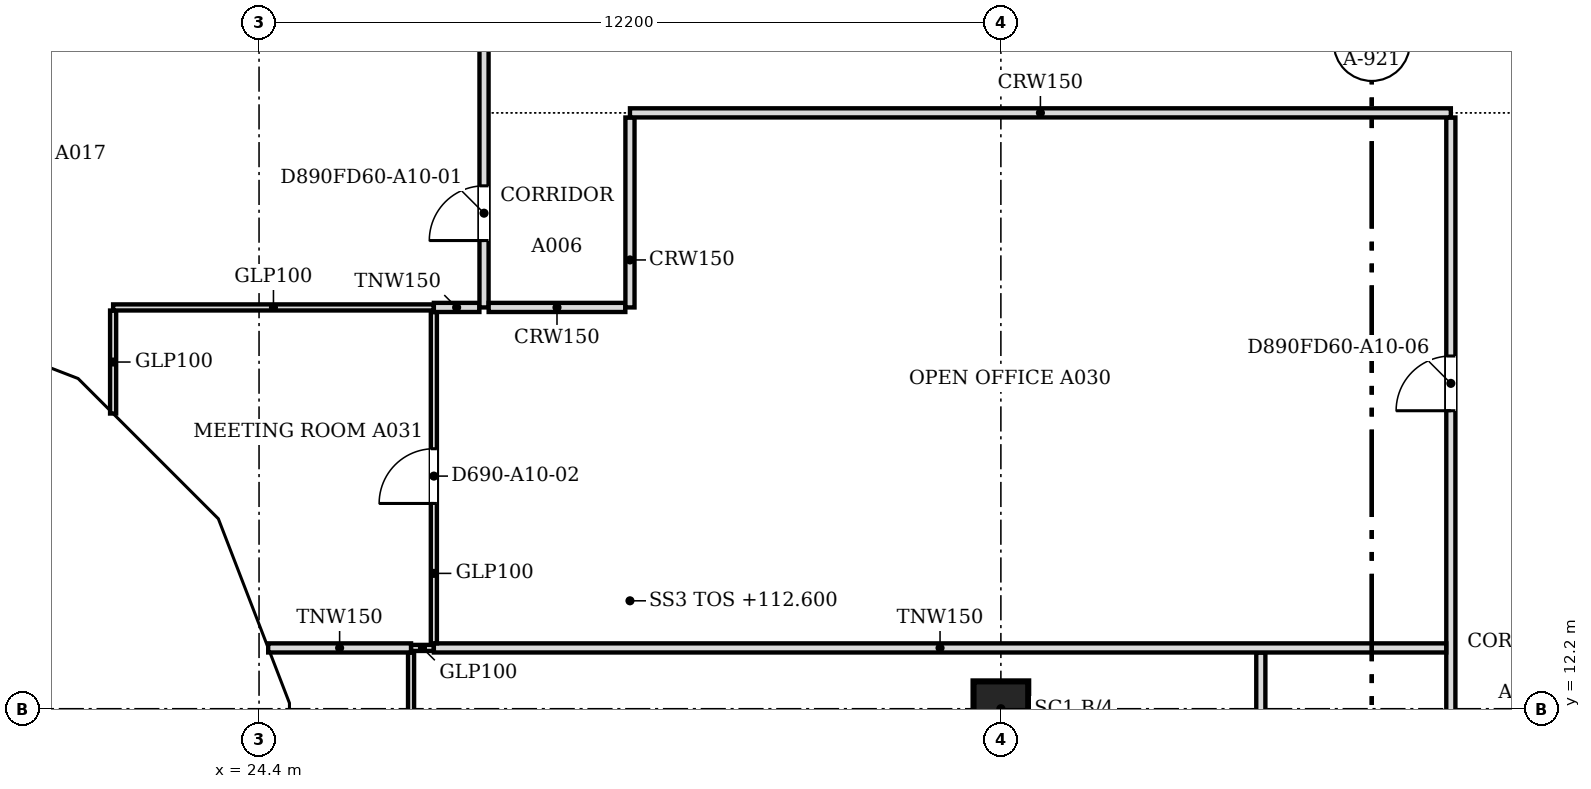
"""IFC4 building model, lengths in metres.
Left out: names, types, materials, properties, quantities, classifications, styles, units other than length and angle.
Written with IfcOpenShell. Run it as: python <this file> out.ifc"""

import sys

from ifc_helpers import new_model, si_unit, direction, frame, frame_2d, origin, origin_2d, place, context, subcontext, project, spatial, polyline, rectangle, outline, extrude, faceted_brep, source, transform, mapped, element, fill, save


model = new_model("IFC4")
c1 = context("Model", 3, precision=1e-05, world=origin(), true_north=direction((0.0, 1.0)))
c2 = subcontext(c1, "Body", "Model", "MODEL_VIEW")
j1 = project(units=[si_unit("LENGTHUNIT", "METRE"), si_unit("PLANEANGLEUNIT", "RADIAN")], contexts=[c1])
p1 = place(None, origin())
s1 = spatial("IfcSite", under=j1, at=p1, CompositionType="ELEMENT")
p2 = place(p1, origin())
s2 = spatial("IfcBuilding", under=s1, at=p2, CompositionType="ELEMENT")
p3 = place(p2, frame((0.0, 0.0, 112.6)))
s3 = spatial("IfcBuildingStorey", under=s2, at=p3, CompositionType="ELEMENT", Elevation=112.6)
p4 = place(p3, frame((36.6, 12.2, 0.0), z_axis=(0.0, 0.0, 1.0), x_axis=(1.0, 0.0, 0.0)))
e1 = element("IfcColumn", 1, at=p4, inside=s3, PredefinedType="COLUMN", context=c2, shape_type="SweptSolid", body=[
    extrude(rectangle(XDim=0.9, YDim=0.9, at=origin_2d()), origin(), (0.0, 0.0, 1.0), 3.6),
])
m1 = source(origin(), c2, "Body", "Brep", [
    faceted_brep([(3.143, -0.25, 0.064), (0.093, -0.25, 3.744), (0.093, -0.25, 0.0), (3.143, -0.25, 0.0), (0.0, 0.25, 3.743), (0.047, 0.25, 3.8), (3.196, 0.25, 0.0), (0.0, 0.25, 0.0), (0.047, 0.0, 3.8), (3.196, -0.0, 0.0)], [[[0, 1, 2, 3]], [[4, 5, 6, 7]], [[6, 5, 8, 1, 0, 9]], [[5, 4, 8]], [[7, 6, 9, 3, 2]], [[7, 2, 1, 8, 4]], [[3, 9, 0]]]),
])
p5 = place(p3, frame((18.303, 18.567, 0.0), z_axis=(0.0, 0.0, 1.0), x_axis=(0.932978940178, -0.359930961693, 0.0)))
e2 = element("IfcWall", 2, at=p5, inside=s3, PredefinedType="SOLIDWALL", context=c2, shape_type="MappedRepresentation", body=[
    mapped(m1, transform((0.0, 0.0, 0.0), scale=1.0)),
])
m2 = source(origin(), c2, "Body", "SweptSolid", [
    extrude(outline(polyline([(2.664, 0.25), (0.247, 3.167), (0.247, 0.25), (2.664, 0.25)])), frame((0.0, 0.26, 0.0), z_axis=(0.0, -1.0, 0.0), x_axis=(1.0, 0.0, 0.0)), (0.0, 0.0, 1.0), 0.52),
])
p6 = place(p5, origin())
e3 = element("IfcOpeningElement", 3, at=p6, cuts=e2, PredefinedType="OPENING", context=c2, shape_type="MappedRepresentation", body=[
    mapped(m2, transform((0.0, 0.0, 0.0), scale=1.0)),
])
m3 = source(origin(), c2, "Body", "Brep", [
    faceted_brep([(3.103, -0.25, 3.736), (0.053, -0.25, 0.064), (0.053, -0.25, 0.0), (3.103, -0.25, 0.0), (0.0, 0.25, 0.0), (3.156, 0.25, 3.8), (3.209, 0.25, 3.736), (3.209, 0.25, 0.0), (3.156, -0.0, 3.8), (0.0, 0.0, 0.0)], [[[0, 1, 2, 3]], [[4, 5, 6, 7]], [[6, 5, 8]], [[5, 4, 9, 1, 0, 8]], [[4, 7, 3, 2, 9]], [[9, 2, 1]], [[3, 7, 6, 8, 0]]]),
])
p7 = place(p3, frame((21.285, 17.417, 0.0), z_axis=(0.0, 0.0, 1.0), x_axis=(0.707106781187, -0.707106781187, 0.0)))
e4 = element("IfcWall", 4, at=p7, inside=s3, PredefinedType="SOLIDWALL", context=c2, shape_type="MappedRepresentation", body=[
    mapped(m3, transform((0.0, 0.0, 0.0), scale=1.0)),
])
m4 = source(origin(), c2, "Body", "SweptSolid", [
    extrude(outline(polyline([(2.956, 3.168), (0.533, 0.25), (2.956, 0.25), (2.956, 3.168)])), frame((0.0, 0.26, 0.0), z_axis=(0.0, -1.0, 0.0), x_axis=(1.0, 0.0, 0.0)), (0.0, 0.0, 1.0), 0.52),
])
p8 = place(p7, origin())
e5 = element("IfcOpeningElement", 5, at=p8, cuts=e4, PredefinedType="OPENING", context=c2, shape_type="MappedRepresentation", body=[
    mapped(m4, transform((0.0, 0.0, 0.0), scale=1.0)),
])
m5 = source(origin(), c2, "Body", "Brep", [
    faceted_brep([(3.156, -0.25, 0.056), (0.106, -0.25, 3.736), (0.106, -0.25, 0.0), (3.156, -0.25, 0.0), (0.0, 0.25, 3.736), (0.053, 0.25, 3.8), (3.202, 0.25, 0.0), (0.0, 0.25, 0.0), (0.053, 0.0, 3.8), (3.202, -0.0, 0.0)], [[[0, 1, 2, 3]], [[4, 5, 6, 7]], [[6, 5, 8, 1, 0, 9]], [[5, 4, 8]], [[7, 6, 9, 3, 2]], [[7, 2, 1, 8, 4]], [[3, 9, 0]]]),
])
p9 = place(p3, frame((23.497, 15.234, 0.0), z_axis=(0.0, 0.0, 1.0), x_axis=(0.359913782069, -0.932985567668, 0.0)))
e6 = element("IfcWall", 6, at=p9, inside=s3, PredefinedType="SOLIDWALL", context=c2, shape_type="MappedRepresentation", body=[
    mapped(m5, transform((0.0, 0.0, 0.0), scale=1.0)),
])
m6 = source(origin(), c2, "Body", "SweptSolid", [
    extrude(outline(polyline([(2.671, 0.25), (0.253, 3.167), (0.253, 0.25), (2.671, 0.25)])), frame((0.0, 0.26, 0.0), z_axis=(0.0, -1.0, 0.0), x_axis=(1.0, 0.0, 0.0)), (0.0, 0.0, 1.0), 0.52),
])
p10 = place(p9, origin())
e7 = element("IfcOpeningElement", 7, at=p10, cuts=e6, PredefinedType="OPENING", context=c2, shape_type="MappedRepresentation", body=[
    mapped(m6, transform((0.0, 0.0, 0.0), scale=1.0)),
])
m7 = source(origin(), c2, "Body", "Brep", [
    faceted_brep([(6.1, -0.25, 0.0), (3.096, -0.25, 3.8), (0.047, -0.25, 0.057), (0.047, -0.25, 0.0), (0.0, 0.25, 0.0), (3.096, 0.25, 3.8), (6.053, 0.25, 0.059), (6.053, 0.25, 0.0), (6.1, -0.0, 0.0), (0.0, 0.0, 0.0)], [[[0, 1, 2, 3]], [[4, 5, 6, 7]], [[6, 5, 1, 0, 8]], [[5, 4, 9, 2, 1]], [[4, 7, 8, 0, 3, 9]], [[9, 3, 2]], [[8, 7, 6]]]),
])
p11 = place(p3, frame((24.65, 12.247, 0.0), z_axis=(0.0, 0.0, 1.0), x_axis=(0.0, -1.0, 0.0)))
e8 = element("IfcWall", 8, at=p11, inside=s3, PredefinedType="SOLIDWALL", context=c2, shape_type="MappedRepresentation", body=[
    mapped(m7, transform((0.0, 0.0, 0.0), scale=1.0)),
])
m8 = source(origin(), c2, "Body", "SweptSolid", [
    extrude(outline(polyline([(5.584, 0.25), (3.094, 3.4), (0.526, 0.25), (5.584, 0.25)])), frame((0.0, 0.26, 0.0), z_axis=(0.0, -1.0, 0.0), x_axis=(1.0, 0.0, 0.0)), (0.0, 0.0, 1.0), 0.52),
])
p12 = place(p11, origin())
e9 = element("IfcOpeningElement", 9, at=p12, cuts=e8, PredefinedType="OPENING", context=c2, shape_type="MappedRepresentation", body=[
    mapped(m8, transform((0.0, 0.0, 0.0), scale=1.0)),
])
p13 = place(p2, frame((0.0, 0.0, 116.4)))
s4 = spatial("IfcBuildingStorey", under=s2, at=p13, CompositionType="ELEMENT", Elevation=116.4)
m9 = source(origin(), c2, "Body", "Brep", [
    faceted_brep([(3.096, -0.25, 7.536), (0.047, -0.25, 3.856), (0.047, -0.25, 3.744), (3.096, -0.25, 0.064), (0.0, 0.25, 3.8), (3.149, 0.25, 7.6), (3.202, 0.25, 7.536), (3.202, 0.25, 0.064), (3.149, 0.25, 0.0), (3.149, -0.0, 0.0), (3.149, -0.0, 7.6), (0.0, 0.0, 3.8)], [[[0, 1, 2, 3]], [[4, 5, 6, 7, 8]], [[8, 7, 9]], [[6, 5, 10]], [[5, 4, 11, 1, 0, 10]], [[4, 8, 9, 3, 2, 11]], [[11, 2, 1]], [[3, 9, 7, 6, 10, 0]]]),
])
p14 = place(p13, frame((18.346, 18.55, -3.8), z_axis=(0.0, 0.0, 1.0), x_axis=(0.932985567668, -0.359913782069, 0.0)))
e10 = element("IfcWall", 10, at=p14, inside=s4, PredefinedType="SOLIDWALL", context=c2, shape_type="MappedRepresentation", body=[
    mapped(m9, transform((0.0, 0.0, 0.0), scale=1.0)),
])
m10 = source(origin(), c2, "Body", "SweptSolid", [
    extrude(outline(polyline([(2.949, 6.967), (0.325, 3.8), (2.949, 0.633), (2.949, 6.967)])), frame((0.0, 0.26, 0.0), z_axis=(0.0, -1.0, 0.0), x_axis=(1.0, 0.0, 0.0)), (0.0, 0.0, 1.0), 0.52),
])
p15 = place(p14, origin())
e11 = element("IfcOpeningElement", 11, at=p15, cuts=e10, PredefinedType="OPENING", context=c2, shape_type="MappedRepresentation", body=[
    mapped(m10, transform((0.0, 0.0, 0.0), scale=1.0)),
])
m11 = source(origin(), c2, "Body", "Brep", [
    faceted_brep([(0.106, -0.25, 0.064), (3.156, -0.25, 3.736), (3.156, -0.25, 3.864), (0.106, -0.25, 7.536), (0.0, 0.25, 7.536), (0.053, 0.25, 7.6), (3.209, 0.25, 3.8), (0.053, 0.25, 0.0), (0.0, 0.25, 0.064), (3.209, -0.0, 3.8), (0.053, 0.0, 0.0), (0.053, 0.0, 7.6)], [[[0, 1, 2, 3]], [[4, 5, 6, 7, 8]], [[7, 6, 9, 1, 0, 10]], [[6, 5, 11, 3, 2, 9]], [[5, 4, 11]], [[8, 7, 10]], [[8, 10, 0, 3, 11, 4]], [[1, 9, 2]]]),
])
p16 = place(p13, frame((21.248, 17.454, -3.8), z_axis=(0.0, 0.0, 1.0), x_axis=(0.707106781187, -0.707106781187, 0.0)))
e12 = element("IfcWall", 12, at=p16, inside=s4, PredefinedType="SOLIDWALL", context=c2, shape_type="MappedRepresentation", body=[
    mapped(m11, transform((0.0, 0.0, 0.0), scale=1.0)),
])
m12 = source(origin(), c2, "Body", "SweptSolid", [
    extrude(outline(polyline([(0.253, 0.632), (2.884, 3.8), (0.253, 6.968), (0.253, 0.632)])), frame((0.0, 0.26, 0.0), z_axis=(0.0, -1.0, 0.0), x_axis=(1.0, 0.0, 0.0)), (0.0, 0.0, 1.0), 0.52),
])
p17 = place(p16, origin())
e13 = element("IfcOpeningElement", 13, at=p17, cuts=e12, PredefinedType="OPENING", context=c2, shape_type="MappedRepresentation", body=[
    mapped(m12, transform((0.0, 0.0, 0.0), scale=1.0)),
])
m13 = source(origin(), c2, "Body", "Brep", [
    faceted_brep([(3.103, -0.25, 7.544), (0.053, -0.25, 3.864), (0.053, -0.25, 3.736), (3.103, -0.25, 0.056), (0.0, 0.25, 3.8), (3.149, 0.25, 7.6), (3.196, 0.25, 7.543), (3.196, 0.25, 0.057), (3.149, 0.25, 0.0), (3.149, -0.0, 0.0), (3.149, -0.0, 7.6), (0.0, 0.0, 3.8)], [[[0, 1, 2, 3]], [[4, 5, 6, 7, 8]], [[8, 7, 9]], [[6, 5, 10]], [[5, 4, 11, 1, 0, 10]], [[4, 8, 9, 3, 2, 11]], [[11, 2, 1]], [[3, 9, 7, 6, 10, 0]]]),
])
p18 = place(p13, frame((23.517, 15.185, -3.8), z_axis=(0.0, 0.0, 1.0), x_axis=(0.359864468756, -0.933004589553, 0.0)))
e14 = element("IfcWall", 14, at=p18, inside=s4, PredefinedType="SOLIDWALL", context=c2, shape_type="MappedRepresentation", body=[
    mapped(m13, transform((0.0, 0.0, 0.0), scale=1.0)),
])
p19 = place(p18, origin())
e15 = element("IfcOpeningElement", 15, at=p19, cuts=e14, PredefinedType="OPENING", context=c2, shape_type="MappedRepresentation", body=[
    mapped(m10, transform((0.0, 0.0, 0.0), scale=1.0)),
])
m14 = source(origin(), c2, "Body", "Brep", [
    faceted_brep([(0.093, -0.25, 0.057), (3.143, -0.25, 3.8), (0.093, -0.25, 7.543), (0.0, 0.25, 7.544), (0.047, 0.25, 7.6), (3.143, 0.25, 3.8), (0.047, 0.25, 0.0), (0.0, 0.25, 0.056), (0.047, 0.0, 0.0), (0.047, 0.0, 7.6)], [[[0, 1, 2]], [[3, 4, 5, 6, 7]], [[6, 5, 1, 0, 8]], [[5, 4, 9, 2, 1]], [[4, 3, 9]], [[7, 6, 8]], [[7, 8, 0, 2, 9, 3]]]),
])
p20 = place(p13, frame((24.65, 12.293, -3.8), z_axis=(0.0, 0.0, 1.0), x_axis=(0.0, -1.0, 0.0)))
e16 = element("IfcWall", 16, at=p20, inside=s4, PredefinedType="SOLIDWALL", context=c2, shape_type="MappedRepresentation", body=[
    mapped(m14, transform((0.0, 0.0, 0.0), scale=1.0)),
])
m15 = source(origin(), c2, "Body", "SweptSolid", [
    extrude(outline(polyline([(0.247, 0.641), (2.821, 3.8), (0.247, 6.959), (0.247, 0.641)])), frame((0.0, 0.26, 0.0), z_axis=(0.0, -1.0, 0.0), x_axis=(1.0, 0.0, 0.0)), (0.0, 0.0, 1.0), 0.52),
])
p21 = place(p20, origin())
e17 = element("IfcOpeningElement", 17, at=p21, cuts=e16, PredefinedType="OPENING", context=c2, shape_type="MappedRepresentation", body=[
    mapped(m15, transform((0.0, 0.0, 0.0), scale=1.0)),
])
p22 = place(p3, frame((44.0, 0.5, 0.0), z_axis=(0.0, 0.0, 1.0), x_axis=(0.0, 1.0, 0.0)))
e18 = element("IfcWall", 18, at=p22, inside=s3, PredefinedType="PARTITIONING", context=c2, shape_type="SweptSolid", body=[
    extrude(rectangle(XDim=21.424, YDim=0.15, at=frame_2d((10.712, 0.0))), origin(), (0.0, 0.0, 1.0), 3.067),
])
m16 = source(origin(), c2, "Body", "SweptSolid", [
    extrude(rectangle(XDim=0.9, YDim=2.1, at=frame_2d((0.45, 1.05))), frame((0.0, 0.085, 0.0), z_axis=(0.0, -1.0, 0.0), x_axis=(1.0, 0.0, 0.0)), (0.0, 0.0, 1.0), 0.17),
])
p23 = place(p22, frame((16.601, 0.0, 0.0)))
e19 = element("IfcOpeningElement", 19, at=p23, cuts=e18, PredefinedType="OPENING", context=c2, shape_type="MappedRepresentation", body=[
    mapped(m16, transform((0.0, 0.0, 0.0), scale=1.0)),
])
m17 = source(origin(), c2, "Body", "SweptSolid", [
    extrude(rectangle(XDim=1.0, YDim=2.1, at=frame_2d((0.5, 1.05))), frame((0.0, 0.085, 0.0), z_axis=(0.0, -1.0, 0.0), x_axis=(1.0, 0.0, 0.0)), (0.0, 0.0, 1.0), 0.17),
])
p24 = place(p22, frame((7.7, 0.0, 0.0)))
e20 = element("IfcOpeningElement", 20, at=p24, cuts=e18, PredefinedType="OPENING", context=c2, shape_type="MappedRepresentation", body=[
    mapped(m17, transform((0.0, 0.0, 0.0), scale=1.0)),
])
p25 = place(p3, frame((26.9, 4.2, 0.0), z_axis=(0.0, 0.0, 1.0), x_axis=(0.0, 1.0, 0.0)))
e21 = element("IfcWall", 21, at=p25, inside=s3, PredefinedType="PARTITIONING", context=c2, shape_type="SweptSolid", body=[
    extrude(rectangle(XDim=8.924, YDim=0.1, at=frame_2d((4.462, 0.0))), origin(), (0.0, 0.0, 1.0), 3.067),
])
m18 = source(origin(), c2, "Body", "SweptSolid", [
    extrude(rectangle(XDim=0.9, YDim=2.1, at=frame_2d((0.45, 1.05))), frame((0.0, 0.06, 0.0), z_axis=(0.0, -1.0, 0.0), x_axis=(1.0, 0.0, 0.0)), (0.0, 0.0, 1.0), 0.12),
])
p26 = place(p25, frame((6.416, 0.0, 0.0)))
e22 = element("IfcOpeningElement", 22, at=p26, cuts=e21, PredefinedType="OPENING", context=c2, shape_type="MappedRepresentation", body=[
    mapped(m18, transform((0.0, 0.0, 0.0), scale=1.0)),
])
p27 = place(p25, frame((2.0, 0.0, 0.0)))
e23 = element("IfcOpeningElement", 23, at=p27, cuts=e21, PredefinedType="OPENING", context=c2, shape_type="MappedRepresentation", body=[
    mapped(m18, transform((0.0, 0.0, 0.0), scale=1.0)),
])
p28 = place(p3, frame((40.875, 4.2, 0.0), z_axis=(0.0, 0.0, 1.0), x_axis=(0.0, 1.0, 0.0)))
e24 = element("IfcWall", 24, at=p28, inside=s3, PredefinedType="PARTITIONING", context=c2, shape_type="SweptSolid", body=[
    extrude(rectangle(XDim=8.924, YDim=0.15, at=frame_2d((4.462, 0.0))), origin(), (0.0, 0.0, 1.0), 3.067),
])
p29 = place(p28, frame((4.0, 0.0, 0.0)))
e25 = element("IfcOpeningElement", 25, at=p29, cuts=e24, PredefinedType="OPENING", context=c2, shape_type="MappedRepresentation", body=[
    mapped(m16, transform((0.0, 0.0, 0.0), scale=1.0)),
])
p30 = place(p3, frame((24.55, 13.2, 0.0), z_axis=(0.0, 0.0, 1.0), x_axis=(1.0, 0.0, 0.0)))
e26 = element("IfcWall", 26, at=p30, inside=s3, PredefinedType="PARTITIONING", context=c2, shape_type="SweptSolid", body=[
    extrude(rectangle(XDim=2.35, YDim=0.15, at=frame_2d((1.175, 0.0))), origin(), (0.0, 0.0, 1.0), 3.067),
])
p31 = place(p3, frame((26.901, 13.2, 0.0), z_axis=(0.0, 0.0, 1.0), x_axis=(1.0, 0.0, 0.0)))
e27 = element("IfcWall", 27, at=p31, inside=s3, PredefinedType="PARTITIONING", context=c2, shape_type="SweptSolid", body=[
    extrude(rectangle(XDim=0.373, YDim=0.1, at=frame_2d((0.187, 0.0))), origin(), (0.0, 0.0, 1.0), 3.067),
])
p32 = place(p3, frame((27.275, 13.2, 0.0), z_axis=(0.0, 0.0, 1.0), x_axis=(1.0, 0.0, 0.0)))
e28 = element("IfcWall", 28, at=p32, inside=s3, PredefinedType="PARTITIONING", context=c2, shape_type="SweptSolid", body=[
    extrude(rectangle(XDim=16.649, YDim=0.15, at=frame_2d((8.325, 0.0))), origin(), (0.0, 0.0, 1.0), 3.067),
])
p33 = place(p3, frame((27.275, 13.276, 0.0), z_axis=(0.0, 0.0, 1.0), x_axis=(0.0, 1.0, 0.0)))
e29 = element("IfcWall", 29, at=p33, inside=s3, PredefinedType="PARTITIONING", context=c2, shape_type="SweptSolid", body=[
    extrude(rectangle(XDim=5.448, YDim=0.1, at=frame_2d((2.724, 0.0))), origin(), (0.0, 0.0, 1.0), 3.067),
])
p34 = place(p33, frame((2.3, 0.0, 0.0)))
e30 = element("IfcOpeningElement", 30, at=p34, cuts=e29, PredefinedType="OPENING", context=c2, shape_type="MappedRepresentation", body=[
    mapped(m18, transform((0.0, 0.0, 0.0), scale=1.0)),
])
p35 = place(p3, frame((22.0, 17.055, 0.0), z_axis=(0.0, 0.0, 1.0), x_axis=(0.0, 1.0, 0.0)))
e31 = element("IfcWall", 31, at=p35, inside=s3, PredefinedType="PARTITIONING", context=c2, shape_type="SweptSolid", body=[
    extrude(rectangle(XDim=1.694, YDim=0.1, at=frame_2d((0.847, 0.0))), origin(), (0.0, 0.0, 1.0), 3.067),
])
p36 = place(p3, frame((22.0, 18.8, 0.0), z_axis=(0.0, 0.0, 1.0), x_axis=(1.0, 0.0, 0.0)))
e32 = element("IfcWall", 32, at=p36, inside=s3, PredefinedType="PARTITIONING", context=c2, shape_type="SweptSolid", body=[
    extrude(rectangle(XDim=5.274, YDim=0.1, at=frame_2d((2.637, 0.0))), origin(), (0.0, 0.0, 1.0), 3.067),
])
p37 = place(p3, frame((27.275, 18.8, 0.0), z_axis=(0.0, 0.0, 1.0), x_axis=(1.0, 0.0, 0.0)))
e33 = element("IfcWall", 33, at=p37, inside=s3, PredefinedType="PARTITIONING", context=c2, shape_type="SweptSolid", body=[
    extrude(rectangle(XDim=0.749, YDim=0.15, at=frame_2d((0.375, 0.0))), origin(), (0.0, 0.0, 1.0), 3.067),
])
p38 = place(p3, frame((28.1, 18.8, 0.0), z_axis=(0.0, 0.0, 1.0), x_axis=(0.0, 1.0, 0.0)))
e34 = element("IfcWall", 34, at=p38, inside=s3, PredefinedType="PARTITIONING", context=c2, shape_type="SweptSolid", body=[
    extrude(rectangle(XDim=26.024, YDim=0.15, at=frame_2d((13.012, 0.0))), origin(), (0.0, 0.0, 1.0), 3.067),
])
p39 = place(p38, frame((1.1, 0.0, 0.0)))
e35 = element("IfcOpeningElement", 35, at=p39, cuts=e34, PredefinedType="OPENING", context=c2, shape_type="MappedRepresentation", body=[
    mapped(m16, transform((0.0, 0.0, 0.0), scale=1.0)),
])
p40 = place(p38, frame((14.301, 0.0, 0.0)))
e36 = element("IfcOpeningElement", 36, at=p40, cuts=e34, PredefinedType="OPENING", context=c2, shape_type="MappedRepresentation", body=[
    mapped(m16, transform((0.0, 0.0, 0.0), scale=1.0)),
])
p41 = place(p38, frame((8.2, 0.0, 0.0)))
e37 = element("IfcOpeningElement", 37, at=p41, cuts=e34, PredefinedType="OPENING", context=c2, shape_type="MappedRepresentation", body=[
    mapped(m16, transform((0.0, 0.0, 0.0), scale=1.0)),
])
p42 = place(p38, frame((21.5, 0.0, 0.0)))
e38 = element("IfcOpeningElement", 38, at=p42, cuts=e34, PredefinedType="OPENING", context=c2, shape_type="MappedRepresentation", body=[
    mapped(m16, transform((0.0, 0.0, 0.0), scale=1.0)),
])
p43 = place(p3, frame((28.176, 18.8, 0.0), z_axis=(0.0, 0.0, 1.0), x_axis=(1.0, 0.0, 0.0)))
e39 = element("IfcWall", 39, at=p43, inside=s3, PredefinedType="PARTITIONING", context=c2, shape_type="SweptSolid", body=[
    extrude(rectangle(XDim=2.248, YDim=0.15, at=frame_2d((1.124, 0.0))), origin(), (0.0, 0.0, 1.0), 3.067),
])
p44 = place(p3, frame((30.5, 18.8, 0.0), z_axis=(0.0, 0.0, 1.0), x_axis=(0.0, 1.0, 0.0)))
e40 = element("IfcWall", 40, at=p44, inside=s3, PredefinedType="PARTITIONING", context=c2, shape_type="SweptSolid", body=[
    extrude(rectangle(XDim=3.124, YDim=0.15, at=frame_2d((1.562, 0.0))), origin(), (0.0, 0.0, 1.0), 3.067),
])
p45 = place(p3, frame((30.5, 22.0, 0.0), z_axis=(0.0, 0.0, 1.0), x_axis=(1.0, 0.0, 0.0)))
e41 = element("IfcWall", 41, at=p45, inside=s3, PredefinedType="PARTITIONING", context=c2, shape_type="SweptSolid", body=[
    extrude(rectangle(XDim=13.5, YDim=0.15, at=frame_2d((6.75, 0.0))), origin(), (0.0, 0.0, 1.0), 3.067),
])
m19 = source(origin(), c2, "Body", "SweptSolid", [
    extrude(rectangle(XDim=0.9, YDim=2.1, at=frame_2d((0.45, 1.05))), frame((0.0, 0.025, 0.0), z_axis=(0.0, -1.0, 0.0), x_axis=(1.0, 0.0, 0.0)), (0.0, 0.0, 1.0), 0.05),
])
p46 = place(p39, origin())
e42 = element("IfcDoor", 42, at=p46, inside=s3, OperationType="SINGLE_SWING_LEFT", PredefinedType="DOOR", context=c2, shape_type="MappedRepresentation", body=[
    mapped(m19, transform((0.0, 0.0, 0.0), scale=1.0)),
])
fill(e35, e42)
p47 = place(p34, origin())
e43 = element("IfcDoor", 43, at=p47, inside=s3, OperationType="SINGLE_SWING_LEFT", PredefinedType="DOOR", context=c2, shape_type="MappedRepresentation", body=[
    mapped(m19, transform((0.0, 0.0, 0.0), scale=1.0)),
])
fill(e30, e43)
p48 = place(p23, origin())
e44 = element("IfcDoor", 44, at=p48, inside=s3, OperationType="SINGLE_SWING_LEFT", PredefinedType="DOOR", context=c2, shape_type="MappedRepresentation", body=[
    mapped(m19, transform((0.0, 0.0, 0.0), scale=1.0)),
])
fill(e19, e44)
save(model, sys.argv[1])
